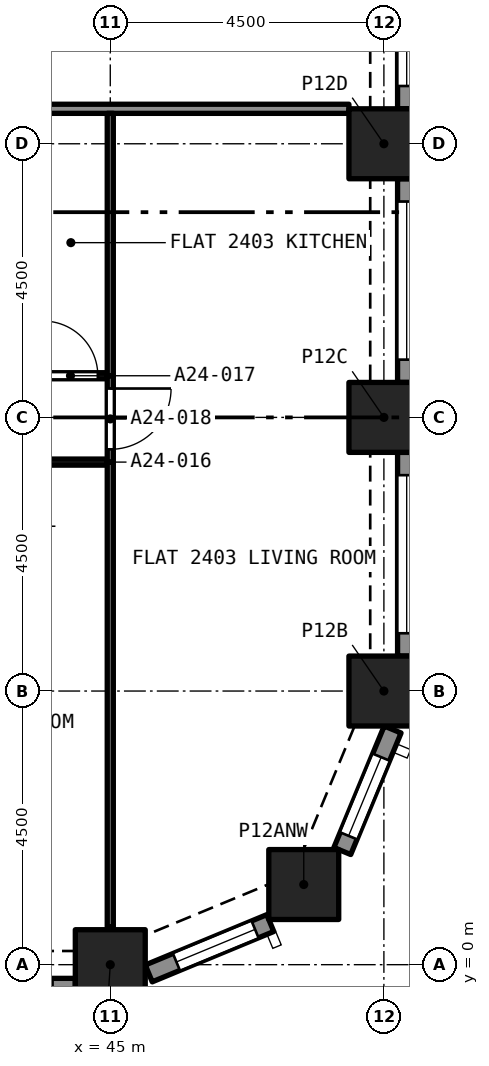
"""IFC4 building model, lengths in metres.
Left out: names, types, materials, properties, quantities, classifications, styles, units other than length and angle.
Written with IfcOpenShell. Run it as: python <this file> out.ifc"""

import sys

from ifc_helpers import new_model, si_unit, direction, frame, frame_2d, origin, origin_2d, place, context, subcontext, project, spatial, rectangle, extrude, element, fill, save


model = new_model("IFC4")
c1 = context("Model", 3, precision=1e-05, world=origin(), true_north=direction((0.0, 1.0)))
c2 = subcontext(c1, "Body", "Model", "MODEL_VIEW")
j1 = project(units=[si_unit("LENGTHUNIT", "METRE"), si_unit("PLANEANGLEUNIT", "RADIAN")], contexts=[c1])
p1 = place(None, origin())
s1 = spatial("IfcSite", under=j1, at=p1, CompositionType="ELEMENT")
p2 = place(p1, origin())
s2 = spatial("IfcBuilding", under=s1, at=p2, CompositionType="ELEMENT")
p3 = place(p2, frame((0.0, 0.0, 89.6)))
s3 = spatial("IfcBuildingStorey", under=s2, at=p3, CompositionType="ELEMENT", Elevation=89.6)
for number, where, z_axis, x_axis in (
    (1, (45.0, 0.0, 0.0), (0.0, 0.0, 1.0), (1.0, 0.0, 0.0)),
    (2, (48.182, 1.318, 0.0), (0.0, 0.0, 1.0), (1.0, 0.0, 0.0)),
    (3, (49.5, 4.5, 0.0), (0.0, 0.0, 1.0), (1.0, 0.0, 0.0)),
    (4, (49.5, 9.0, 0.0), (0.0, 0.0, 1.0), (1.0, 0.0, 0.0)),
    (5, (49.5, 13.5, 0.0), (0.0, 0.0, 1.0), (1.0, 0.0, 0.0)),
):
    element("IfcColumn", number, at=place(p3, frame(where, z_axis=z_axis, x_axis=x_axis)), inside=s3, PredefinedType="COLUMN", context=c2, shape_type="SweptSolid", body=[
        extrude(rectangle(XDim=1.15, YDim=1.15, at=origin_2d()), origin(), (0.0, 0.0, 1.0), 3.2),
    ])
p4 = place(p3, frame((44.425, -0.375, 0.0), z_axis=(0.0, 0.0, 1.0), x_axis=(-1.0, 0.0, 0.0)))
e6 = element("IfcWall", 6, at=p4, inside=s3, PredefinedType="SOLIDWALL", context=c2, shape_type="SweptSolid", body=[
    extrude(rectangle(XDim=3.35, YDim=0.3, at=frame_2d((1.675, 0.0))), origin(), (0.0, 0.0, 1.0), 3.2),
])
p5 = place(p4, frame((0.375, 0.0, 0.45)))
e7 = element("IfcOpeningElement", 7, at=p5, cuts=e6, PredefinedType="OPENING", context=c2, shape_type="SweptSolid", body=[
    extrude(rectangle(XDim=2.6, YDim=1.95, at=frame_2d((1.3, 0.975))), frame((0.0, 0.16, 0.0), z_axis=(0.0, -1.0, 0.0), x_axis=(1.0, 0.0, 0.0)), (0.0, 0.0, 1.0), 0.32),
])
p6 = place(p3, frame((47.631, 0.684, 0.0), z_axis=(0.0, 0.0, 1.0), x_axis=(-0.923862802911, -0.382723818695, 0.0)))
e8 = element("IfcWall", 8, at=p6, inside=s3, PredefinedType="SOLIDWALL", context=c2, shape_type="SweptSolid", body=[
    extrude(rectangle(XDim=2.164, YDim=0.3, at=frame_2d((1.082, 0.0))), origin(), (0.0, 0.0, 1.0), 3.2),
])
p7 = place(p6, frame((0.271, 0.0, 0.45)))
e9 = element("IfcOpeningElement", 9, at=p7, cuts=e8, PredefinedType="OPENING", context=c2, shape_type="SweptSolid", body=[
    extrude(rectangle(XDim=1.4, YDim=1.95, at=frame_2d((0.7, 0.975))), frame((0.0, 0.16, 0.0), z_axis=(0.0, -1.0, 0.0), x_axis=(1.0, 0.0, 0.0)), (0.0, 0.0, 1.0), 0.32),
])
p8 = place(p3, frame((49.644, 3.868, 0.0), z_axis=(0.0, 0.0, 1.0), x_axis=(-0.382723818695, -0.923862802911, 0.0)))
e10 = element("IfcWall", 10, at=p8, inside=s3, PredefinedType="SOLIDWALL", context=c2, shape_type="SweptSolid", body=[
    extrude(rectangle(XDim=2.164, YDim=0.3, at=frame_2d((1.082, 0.0))), origin(), (0.0, 0.0, 1.0), 3.2),
])
p9 = place(p8, frame((0.493, 0.0, 0.45)))
e11 = element("IfcOpeningElement", 11, at=p9, cuts=e10, PredefinedType="OPENING", context=c2, shape_type="SweptSolid", body=[
    extrude(rectangle(XDim=1.4, YDim=1.95, at=frame_2d((0.7, 0.975))), frame((0.0, 0.16, 0.0), z_axis=(0.0, -1.0, 0.0), x_axis=(1.0, 0.0, 0.0)), (0.0, 0.0, 1.0), 0.32),
])
p10 = place(p3, frame((49.875, 8.425, 0.0), z_axis=(0.0, 0.0, 1.0), x_axis=(0.0, -1.0, 0.0)))
e12 = element("IfcWall", 12, at=p10, inside=s3, PredefinedType="SOLIDWALL", context=c2, shape_type="SweptSolid", body=[
    extrude(rectangle(XDim=3.35, YDim=0.3, at=frame_2d((1.675, 0.0))), origin(), (0.0, 0.0, 1.0), 3.2),
])
p11 = place(p10, frame((0.375, 0.0, 0.45)))
e13 = element("IfcOpeningElement", 13, at=p11, cuts=e12, PredefinedType="OPENING", context=c2, shape_type="SweptSolid", body=[
    extrude(rectangle(XDim=2.6, YDim=1.95, at=frame_2d((1.3, 0.975))), frame((0.0, 0.16, 0.0), z_axis=(0.0, -1.0, 0.0), x_axis=(1.0, 0.0, 0.0)), (0.0, 0.0, 1.0), 0.32),
])
p12 = place(p3, frame((49.875, 12.925, 0.0), z_axis=(0.0, 0.0, 1.0), x_axis=(0.0, -1.0, 0.0)))
e14 = element("IfcWall", 14, at=p12, inside=s3, PredefinedType="SOLIDWALL", context=c2, shape_type="SweptSolid", body=[
    extrude(rectangle(XDim=3.35, YDim=0.3, at=frame_2d((1.675, 0.0))), origin(), (0.0, 0.0, 1.0), 3.2),
])
p13 = place(p12, frame((0.375, 0.0, 0.45)))
e15 = element("IfcOpeningElement", 15, at=p13, cuts=e14, PredefinedType="OPENING", context=c2, shape_type="SweptSolid", body=[
    extrude(rectangle(XDim=2.6, YDim=1.95, at=frame_2d((1.3, 0.975))), frame((0.0, 0.16, 0.0), z_axis=(0.0, -1.0, 0.0), x_axis=(1.0, 0.0, 0.0)), (0.0, 0.0, 1.0), 0.32),
])
p14 = place(p3, frame((49.875, 17.425, 0.0), z_axis=(0.0, 0.0, 1.0), x_axis=(0.0, -1.0, 0.0)))
e16 = element("IfcWall", 16, at=p14, inside=s3, PredefinedType="SOLIDWALL", context=c2, shape_type="SweptSolid", body=[
    extrude(rectangle(XDim=3.35, YDim=0.3, at=frame_2d((1.675, 0.0))), origin(), (0.0, 0.0, 1.0), 3.2),
])
p15 = place(p14, frame((0.375, 0.0, 0.45)))
e17 = element("IfcOpeningElement", 17, at=p15, cuts=e16, PredefinedType="OPENING", context=c2, shape_type="SweptSolid", body=[
    extrude(rectangle(XDim=2.6, YDim=1.95, at=frame_2d((1.3, 0.975))), frame((0.0, 0.16, 0.0), z_axis=(0.0, -1.0, 0.0), x_axis=(1.0, 0.0, 0.0)), (0.0, 0.0, 1.0), 0.32),
])
p16 = place(p3, frame((42.6, 14.075, 0.0), z_axis=(0.0, 0.0, 1.0), x_axis=(1.0, 0.0, 0.0)))
e18 = element("IfcWall", 18, at=p16, inside=s3, PredefinedType="PARTITIONING", context=c2, shape_type="SweptSolid", body=[
    extrude(rectangle(XDim=6.325, YDim=0.15, at=frame_2d((3.163, 0.0))), origin(), (0.0, 0.0, 1.0), 2.9),
])
p17 = place(p3, frame((44.95, 8.265, 0.0), z_axis=(0.0, 0.0, 1.0), x_axis=(-1.0, 0.0, 0.0)))
e19 = element("IfcWall", 19, at=p17, inside=s3, PredefinedType="PARTITIONING", context=c2, shape_type="SweptSolid", body=[
    extrude(rectangle(XDim=4.35, YDim=0.1, at=frame_2d((2.175, 0.0))), origin(), (0.0, 0.0, 1.0), 2.9),
])
p18 = place(p17, frame((1.75, 0.0, 0.0)))
e20 = element("IfcOpeningElement", 20, at=p18, cuts=e19, PredefinedType="OPENING", context=c2, shape_type="SweptSolid", body=[
    extrude(rectangle(XDim=0.9, YDim=2.1, at=frame_2d((0.45, 1.05))), frame((0.0, 0.06, 0.0), z_axis=(0.0, -1.0, 0.0), x_axis=(1.0, 0.0, 0.0)), (0.0, 0.0, 1.0), 0.12),
])
p19 = place(p3, frame((45.0, 0.622, 0.0), z_axis=(0.0, 0.0, 1.0), x_axis=(0.0, 1.0, 0.0)))
e21 = element("IfcWall", 21, at=p19, inside=s3, PredefinedType="PARTITIONING", context=c2, shape_type="SweptSolid", body=[
    extrude(rectangle(XDim=7.643, YDim=0.1, at=frame_2d((3.821, 0.0))), origin(), (0.0, 0.0, 1.0), 2.9),
])
p20 = place(p3, frame((43.691, 9.685, 0.0), z_axis=(0.0, 0.0, 1.0), x_axis=(1.0, 0.0, 0.0)))
e22 = element("IfcWall", 22, at=p20, inside=s3, PredefinedType="PARTITIONING", context=c2, shape_type="SweptSolid", body=[
    extrude(rectangle(XDim=1.259, YDim=0.1, at=frame_2d((0.629, 0.0))), origin(), (0.0, 0.0, 1.0), 2.9),
])
p21 = place(p20, frame((0.205, 0.0, 0.0)))
e23 = element("IfcOpeningElement", 23, at=p21, cuts=e22, PredefinedType="OPENING", context=c2, shape_type="SweptSolid", body=[
    extrude(rectangle(XDim=0.9, YDim=2.1, at=frame_2d((0.45, 1.05))), frame((0.0, 0.06, 0.0), z_axis=(0.0, -1.0, 0.0), x_axis=(1.0, 0.0, 0.0)), (0.0, 0.0, 1.0), 0.12),
])
p22 = place(p3, frame((45.0, 9.685, 0.0), z_axis=(0.0, 0.0, 1.0), x_axis=(0.0, -1.0, 0.0)))
e24 = element("IfcWall", 24, at=p22, inside=s3, PredefinedType="PARTITIONING", context=c2, shape_type="SweptSolid", body=[
    extrude(rectangle(XDim=1.42, YDim=0.1, at=frame_2d((0.71, 0.0))), origin(), (0.0, 0.0, 1.0), 2.9),
])
p23 = place(p22, frame((0.21, 0.0, 0.0)))
e25 = element("IfcOpeningElement", 25, at=p23, cuts=e24, PredefinedType="OPENING", context=c2, shape_type="SweptSolid", body=[
    extrude(rectangle(XDim=1.0, YDim=2.1, at=frame_2d((0.5, 1.05))), frame((0.0, 0.06, 0.0), z_axis=(0.0, -1.0, 0.0), x_axis=(1.0, 0.0, 0.0)), (0.0, 0.0, 1.0), 0.12),
])
p24 = place(p3, frame((45.0, 9.685, 0.0), z_axis=(0.0, 0.0, 1.0), x_axis=(0.0, 1.0, 0.0)))
e26 = element("IfcWall", 26, at=p24, inside=s3, PredefinedType="PARTITIONING", context=c2, shape_type="SweptSolid", body=[
    extrude(rectangle(XDim=4.315, YDim=0.1, at=frame_2d((2.157, 0.0))), origin(), (0.0, 0.0, 1.0), 2.9),
])
p25 = place(p7, origin())
e27 = element("IfcWindow", 27, at=p25, inside=s3, PartitioningType="SINGLE_PANEL", PredefinedType="WINDOW", context=c2, shape_type="SweptSolid", body=[
    extrude(rectangle(XDim=1.4, YDim=1.95, at=frame_2d((0.7, 0.975))), frame((0.0, 0.03, 0.0), z_axis=(0.0, -1.0, 0.0), x_axis=(1.0, 0.0, 0.0)), (0.0, 0.0, 1.0), 0.06),
])
fill(e9, e27)
p26 = place(p9, origin())
e28 = element("IfcWindow", 28, at=p26, inside=s3, PartitioningType="SINGLE_PANEL", PredefinedType="WINDOW", context=c2, shape_type="SweptSolid", body=[
    extrude(rectangle(XDim=1.4, YDim=1.95, at=frame_2d((0.7, 0.975))), frame((0.0, 0.03, 0.0), z_axis=(0.0, -1.0, 0.0), x_axis=(1.0, 0.0, 0.0)), (0.0, 0.0, 1.0), 0.06),
])
fill(e11, e28)
p27 = place(p11, origin())
e29 = element("IfcWindow", 29, at=p27, inside=s3, PartitioningType="SINGLE_PANEL", PredefinedType="WINDOW", context=c2, shape_type="SweptSolid", body=[
    extrude(rectangle(XDim=2.6, YDim=1.95, at=frame_2d((1.3, 0.975))), frame((0.0, 0.03, 0.0), z_axis=(0.0, -1.0, 0.0), x_axis=(1.0, 0.0, 0.0)), (0.0, 0.0, 1.0), 0.06),
])
fill(e13, e29)
p28 = place(p13, origin())
e30 = element("IfcWindow", 30, at=p28, inside=s3, PartitioningType="SINGLE_PANEL", PredefinedType="WINDOW", context=c2, shape_type="SweptSolid", body=[
    extrude(rectangle(XDim=2.6, YDim=1.95, at=frame_2d((1.3, 0.975))), frame((0.0, 0.03, 0.0), z_axis=(0.0, -1.0, 0.0), x_axis=(1.0, 0.0, 0.0)), (0.0, 0.0, 1.0), 0.06),
])
fill(e15, e30)
p29 = place(p15, origin())
e31 = element("IfcWindow", 31, at=p29, inside=s3, PartitioningType="SINGLE_PANEL", PredefinedType="WINDOW", context=c2, shape_type="SweptSolid", body=[
    extrude(rectangle(XDim=2.6, YDim=1.95, at=frame_2d((1.3, 0.975))), frame((0.0, 0.03, 0.0), z_axis=(0.0, -1.0, 0.0), x_axis=(1.0, 0.0, 0.0)), (0.0, 0.0, 1.0), 0.06),
])
fill(e17, e31)
p30 = place(p21, origin())
e32 = element("IfcDoor", 32, at=p30, inside=s3, OperationType="SINGLE_SWING_RIGHT", PredefinedType="DOOR", context=c2, shape_type="SweptSolid", body=[
    extrude(rectangle(XDim=0.9, YDim=2.1, at=frame_2d((0.45, 1.05))), frame((0.0, 0.025, 0.0), z_axis=(0.0, -1.0, 0.0), x_axis=(1.0, 0.0, 0.0)), (0.0, 0.0, 1.0), 0.05),
])
fill(e23, e32)
p31 = place(p23, origin())
e33 = element("IfcDoor", 33, at=p31, inside=s3, OperationType="SINGLE_SWING_RIGHT", PredefinedType="DOOR", context=c2, shape_type="SweptSolid", body=[
    extrude(rectangle(XDim=1.0, YDim=2.1, at=frame_2d((0.5, 1.05))), frame((0.0, 0.025, 0.0), z_axis=(0.0, -1.0, 0.0), x_axis=(1.0, 0.0, 0.0)), (0.0, 0.0, 1.0), 0.05),
])
fill(e25, e33)
save(model, sys.argv[1])
